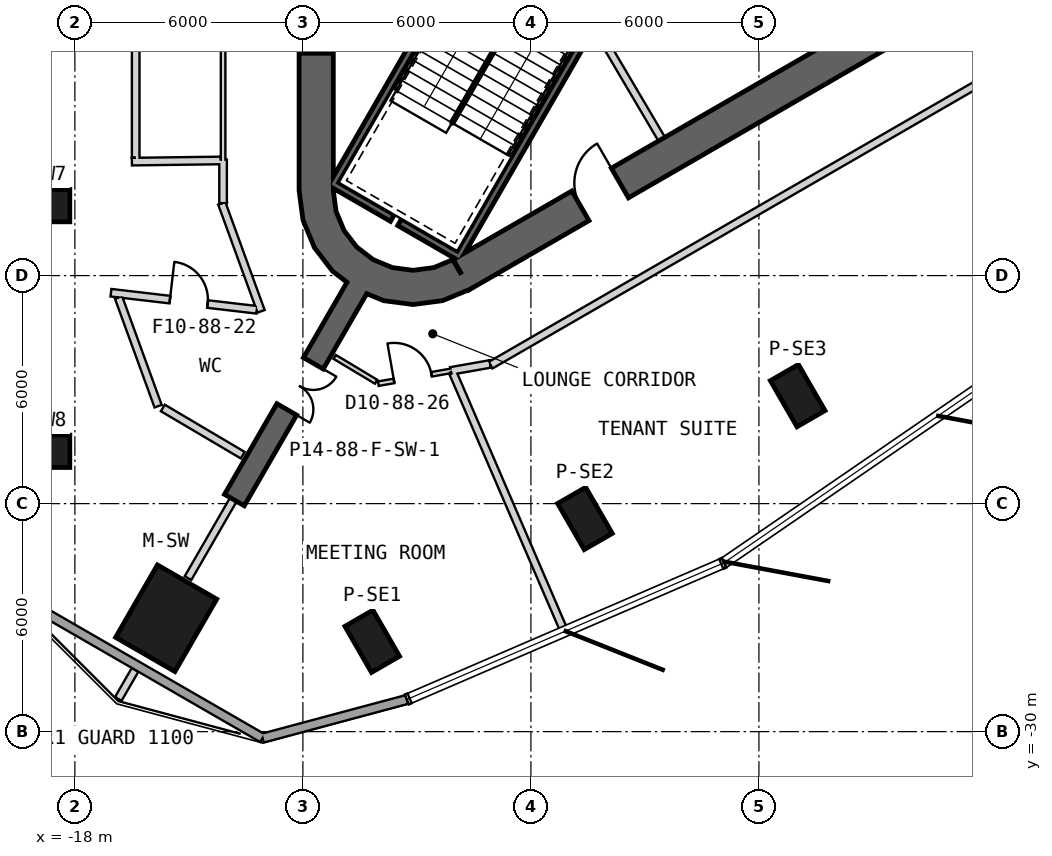
"""IFC4 building model, lengths in metres.
Left out: names, types, materials, properties, quantities, classifications, styles, units other than length and angle.
Written with IfcOpenShell. Run it as: python <this file> out.ifc"""

import sys

from ifc_helpers import new_model, si_unit, direction, frame, frame_2d, origin, origin_2d, place, context, subcontext, project, spatial, polyline, rectangle, outline, extrude, element, fill, save


model = new_model("IFC4")
c1 = context("Model", 3, precision=1e-05, world=origin(), true_north=direction((0.0, 1.0)))
c2 = subcontext(c1, "Body", "Model", "MODEL_VIEW")
j1 = project(units=[si_unit("LENGTHUNIT", "METRE"), si_unit("PLANEANGLEUNIT", "RADIAN")], contexts=[c1])
p1 = place(None, origin())
s1 = spatial("IfcSite", under=j1, at=p1, CompositionType="ELEMENT")
p2 = place(p1, origin())
s2 = spatial("IfcBuilding", under=s1, at=p2, CompositionType="ELEMENT")
p3 = place(p2, frame((0.0, 0.0, 380.6)))
s3 = spatial("IfcBuildingStorey", under=s2, at=p3, CompositionType="ELEMENT", Elevation=380.6)
p4 = place(p3, frame((-15.598, -27.016, 0.0), z_axis=(0.0, 0.0, 1.0), x_axis=(-0.5, -0.866025403784, 0.0)))
e1 = element("IfcColumn", 1, at=p4, inside=s3, PredefinedType="COLUMN", context=c2, shape_type="SweptSolid", body=[
    extrude(rectangle(XDim=2.2, YDim=1.8, at=origin_2d()), origin(), (0.0, 0.0, 1.0), 3.9),
])
for number, where, z_axis, x_axis in (
    (2, (-18.834, -16.16, 0.0), (0.0, 0.0, 1.0), (-1.0, 0.0, 0.0)),
    (3, (-18.834, -22.624, 0.0), (0.0, 0.0, 1.0), (-1.0, 0.0, 0.0)),
    (4, (-10.176, -27.623, 0.0), (0.0, 0.0, 1.0), (0.5, -0.866, 0.0)),
    (5, (-4.578, -24.391, 0.0), (0.0, 0.0, 1.0), (0.5, -0.866, 0.0)),
    (6, (1.02, -21.159, 0.0), (0.0, 0.0, 1.0), (0.5, -0.866, 0.0)),
):
    element("IfcColumn", number, at=place(p3, frame(where, z_axis=z_axis, x_axis=x_axis)), inside=s3, PredefinedType="COLUMN", context=c2, shape_type="SweptSolid", body=[
        extrude(rectangle(XDim=1.4, YDim=0.85, at=origin_2d()), origin(), (0.0, 0.0, 1.0), 3.9),
    ])
p5 = place(p3, frame((-11.65, 15.762, 0.0), z_axis=(0.0, 0.0, 1.0), x_axis=(0.0, -1.0, 0.0)))
e7 = element("IfcWall", 7, at=p5, inside=s3, PredefinedType="SHEAR", context=c2, shape_type="SweptSolid", body=[
    extrude(rectangle(XDim=31.523, YDim=0.9, at=frame_2d((15.762, 0.0))), origin(), (0.0, 0.0, 1.0), 3.9),
])
p6 = place(p5, frame((7.062, 0.0, 0.0)))
e8 = element("IfcOpeningElement", 8, at=p6, cuts=e7, PredefinedType="OPENING", context=c2, shape_type="SweptSolid", body=[
    extrude(rectangle(XDim=1.2, YDim=2.4, at=frame_2d((0.6, 1.2))), frame((0.0, 0.46, 0.0), z_axis=(0.0, -1.0, 0.0), x_axis=(1.0, 0.0, 0.0)), (0.0, 0.0, 1.0), 0.92),
])
p7 = place(p5, frame((9.762, 0.0, 0.0)))
e9 = element("IfcOpeningElement", 9, at=p7, cuts=e7, PredefinedType="OPENING", context=c2, shape_type="SweptSolid", body=[
    extrude(rectangle(XDim=1.2, YDim=2.4, at=frame_2d((0.6, 1.2))), frame((0.0, 0.46, 0.0), z_axis=(0.0, -1.0, 0.0), x_axis=(1.0, 0.0, 0.0)), (0.0, 0.0, 1.0), 0.92),
])
p8 = place(p5, frame((12.462, 0.0, 0.0)))
e10 = element("IfcOpeningElement", 10, at=p8, cuts=e7, PredefinedType="OPENING", context=c2, shape_type="SweptSolid", body=[
    extrude(rectangle(XDim=1.2, YDim=2.4, at=frame_2d((0.6, 1.2))), frame((0.0, 0.46, 0.0), z_axis=(0.0, -1.0, 0.0), x_axis=(1.0, 0.0, 0.0)), (0.0, 0.0, 1.0), 0.92),
])
p9 = place(p5, frame((15.162, 0.0, 0.0)))
e11 = element("IfcOpeningElement", 11, at=p9, cuts=e7, PredefinedType="OPENING", context=c2, shape_type="SweptSolid", body=[
    extrude(rectangle(XDim=1.2, YDim=2.4, at=frame_2d((0.6, 1.2))), frame((0.0, 0.46, 0.0), z_axis=(0.0, -1.0, 0.0), x_axis=(1.0, 0.0, 0.0)), (0.0, 0.0, 1.0), 0.92),
])
p10 = place(p5, frame((17.862, 0.0, 0.0)))
e12 = element("IfcOpeningElement", 12, at=p10, cuts=e7, PredefinedType="OPENING", context=c2, shape_type="SweptSolid", body=[
    extrude(rectangle(XDim=1.2, YDim=2.4, at=frame_2d((0.6, 1.2))), frame((0.0, 0.46, 0.0), z_axis=(0.0, -1.0, 0.0), x_axis=(1.0, 0.0, 0.0)), (0.0, 0.0, 1.0), 0.92),
])
p11 = place(p5, frame((20.562, 0.0, 0.0)))
e13 = element("IfcOpeningElement", 13, at=p11, cuts=e7, PredefinedType="OPENING", context=c2, shape_type="SweptSolid", body=[
    extrude(rectangle(XDim=1.2, YDim=2.4, at=frame_2d((0.6, 1.2))), frame((0.0, 0.46, 0.0), z_axis=(0.0, -1.0, 0.0), x_axis=(1.0, 0.0, 0.0)), (0.0, 0.0, 1.0), 0.92),
])
p12 = place(p5, frame((23.262, 0.0, 0.0)))
e14 = element("IfcOpeningElement", 14, at=p12, cuts=e7, PredefinedType="OPENING", context=c2, shape_type="SweptSolid", body=[
    extrude(rectangle(XDim=1.2, YDim=2.4, at=frame_2d((0.6, 1.2))), frame((0.0, 0.46, 0.0), z_axis=(0.0, -1.0, 0.0), x_axis=(1.0, 0.0, 0.0)), (0.0, 0.0, 1.0), 0.92),
])
p13 = place(p5, frame((3.612, 0.0, 0.0)))
e15 = element("IfcOpeningElement", 15, at=p13, cuts=e7, PredefinedType="OPENING", context=c2, shape_type="SweptSolid", body=[
    extrude(rectangle(XDim=1.2, YDim=2.4, at=frame_2d((0.6, 1.2))), frame((0.0, 0.46, 0.0), z_axis=(0.0, -1.0, 0.0), x_axis=(1.0, 0.0, 0.0)), (0.0, 0.0, 1.0), 0.92),
])
p14 = place(p5, frame((26.712, 0.0, 0.0)))
e16 = element("IfcOpeningElement", 16, at=p14, cuts=e7, PredefinedType="OPENING", context=c2, shape_type="SweptSolid", body=[
    extrude(rectangle(XDim=1.2, YDim=2.4, at=frame_2d((0.6, 1.2))), frame((0.0, 0.46, 0.0), z_axis=(0.0, -1.0, 0.0), x_axis=(1.0, 0.0, 0.0)), (0.0, 0.0, 1.0), 0.92),
])
p15 = place(p3, frame((-7.825, -17.97, 0.0), z_axis=(0.0, 0.0, 1.0), x_axis=(0.866028369851, 0.499994862586, 0.0)))
e17 = element("IfcWall", 17, at=p15, inside=s3, PredefinedType="SHEAR", context=c2, shape_type="SweptSolid", body=[
    extrude(rectangle(XDim=31.523, YDim=0.9, at=frame_2d((15.762, 0.0))), origin(), (0.0, 0.0, 1.0), 3.9),
])
p16 = place(p15, frame((17.862, 0.0, 0.0)))
e18 = element("IfcOpeningElement", 18, at=p16, cuts=e17, PredefinedType="OPENING", context=c2, shape_type="SweptSolid", body=[
    extrude(rectangle(XDim=1.2, YDim=2.4, at=frame_2d((0.6, 1.2))), frame((0.0, 0.46, 0.0), z_axis=(0.0, -1.0, 0.0), x_axis=(1.0, 0.0, 0.0)), (0.0, 0.0, 1.0), 0.92),
])
p17 = place(p15, frame((20.562, 0.0, 0.0)))
e19 = element("IfcOpeningElement", 19, at=p17, cuts=e17, PredefinedType="OPENING", context=c2, shape_type="SweptSolid", body=[
    extrude(rectangle(XDim=1.2, YDim=2.4, at=frame_2d((0.6, 1.2))), frame((0.0, 0.46, 0.0), z_axis=(0.0, -1.0, 0.0), x_axis=(1.0, 0.0, 0.0)), (0.0, 0.0, 1.0), 0.92),
])
p18 = place(p15, frame((26.712, 0.0, 0.0)))
e20 = element("IfcOpeningElement", 20, at=p18, cuts=e17, PredefinedType="OPENING", context=c2, shape_type="SweptSolid", body=[
    extrude(rectangle(XDim=1.2, YDim=2.4, at=frame_2d((0.6, 1.2))), frame((0.0, 0.46, 0.0), z_axis=(0.0, -1.0, 0.0), x_axis=(1.0, 0.0, 0.0)), (0.0, 0.0, 1.0), 0.92),
])
p19 = place(p15, frame((3.612, 0.0, 0.0)))
e21 = element("IfcOpeningElement", 21, at=p19, cuts=e17, PredefinedType="OPENING", context=c2, shape_type="SweptSolid", body=[
    extrude(rectangle(XDim=1.2, YDim=2.4, at=frame_2d((0.6, 1.2))), frame((0.0, 0.46, 0.0), z_axis=(0.0, -1.0, 0.0), x_axis=(1.0, 0.0, 0.0)), (0.0, 0.0, 1.0), 0.92),
])
p20 = place(p3, origin())
e22 = element("IfcWall", 22, at=p20, inside=s3, PredefinedType="SHEAR", context=c2, shape_type="SweptSolid", body=[
    extrude(outline(polyline([(-12.1, -15.762), (-11.998, -16.538), (-11.698, -17.262), (-11.221, -17.883), (-10.6, -18.36), (-9.876, -18.659), (-9.1, -18.762), (-8.323, -18.659), (-7.6, -18.36), (-8.05, -17.58), (-8.556, -17.79), (-9.1, -17.862), (-9.644, -17.79), (-10.15, -17.58), (-10.585, -17.247), (-10.919, -16.812), (-11.128, -16.305), (-11.2, -15.762), (-12.1, -15.762)])), origin(), (0.0, 0.0, 1.0), 3.9),
])
p21 = place(p3, frame((-10.575, -18.316, 0.0), z_axis=(0.0, 0.0, 1.0), x_axis=(-0.500011655475, -0.866018674388, 0.0)))
e23 = element("IfcWall", 23, at=p21, inside=s3, PredefinedType="SHEAR", context=c2, shape_type="SweptSolid", body=[
    extrude(rectangle(XDim=6.455, YDim=0.6, at=frame_2d((3.228, 0.0))), origin(), (0.0, 0.0, 1.0), 3.9),
])
p22 = place(p21, frame((2.35, 0.0, 0.0)))
e24 = element("IfcOpeningElement", 24, at=p22, cuts=e23, PredefinedType="OPENING", context=c2, shape_type="SweptSolid", body=[
    extrude(rectangle(XDim=1.4, YDim=2.4, at=frame_2d((0.7, 1.2))), frame((0.0, 0.31, 0.0), z_axis=(0.0, -1.0, 0.0), x_axis=(1.0, 0.0, 0.0)), (0.0, 0.0, 1.0), 0.62),
])
p23 = place(p3, frame((-19.598, -26.398, 0.0), z_axis=(0.0, 0.0, 1.0), x_axis=(0.86602506914, -0.500000579621, 0.0)))
e25 = element("IfcWall", 25, at=p23, inside=s3, PredefinedType="SOLIDWALL", context=c2, shape_type="SweptSolid", body=[
    extrude(rectangle(XDim=7.548, YDim=0.24, at=frame_2d((3.774, 0.0))), origin(), (0.0, 0.0, 1.0), 3.6),
])
p24 = place(p3, frame((-13.062, -30.172, 0.0), z_axis=(0.0, 0.0, 1.0), x_axis=(0.965923930123, 0.258826121588, 0.0)))
e26 = element("IfcWall", 26, at=p24, inside=s3, PredefinedType="SOLIDWALL", context=c2, shape_type="SweptSolid", body=[
    extrude(rectangle(XDim=3.931, YDim=0.24, at=frame_2d((1.965, 0.0))), origin(), (0.0, 0.0, 1.0), 3.6),
])
p25 = place(p3, frame((-3.905, -10.563, -0.3), z_axis=(0.0, 0.0, 1.0), x_axis=(-0.500012932018, -0.866017937352, 0.0)))
e27 = element("IfcWall", 27, at=p25, inside=s3, PredefinedType="SHEAR", context=c2, shape_type="SweptSolid", body=[
    extrude(rectangle(XDim=8.1, YDim=0.2, at=frame_2d((4.05, 0.0))), origin(), (0.0, 0.0, 1.0), 3.9),
])
p26 = place(p3, frame((-11.282, -15.541, -0.3), z_axis=(0.0, 0.0, 1.0), x_axis=(0.866000578957, -0.500042995397, 0.0)))
e28 = element("IfcWall", 28, at=p26, inside=s3, PredefinedType="SHEAR", context=c2, shape_type="SweptSolid", body=[
    extrude(rectangle(XDim=1.89, YDim=0.2, at=frame_2d((0.945, 0.0))), origin(), (0.0, 0.0, 1.0), 3.9),
])
p27 = place(p3, frame((-9.455, -16.596, -0.3), z_axis=(0.0, 0.0, 1.0), x_axis=(0.866038843867, -0.499976720371, 0.0)))
e29 = element("IfcWall", 29, at=p27, inside=s3, PredefinedType="SHEAR", context=c2, shape_type="SweptSolid", body=[
    extrude(rectangle(XDim=1.69, YDim=0.2, at=frame_2d((0.845, 0.0))), origin(), (0.0, 0.0, 1.0), 3.9),
])
p28 = place(p3, frame((-7.196, -8.663, -0.3), z_axis=(0.0, 0.0, 1.0), x_axis=(-0.499997992926, -0.866026562566, 0.0)))
e30 = element("IfcWall", 30, at=p28, inside=s3, PredefinedType="SHEAR", context=c2, shape_type="SweptSolid", body=[
    extrude(rectangle(XDim=7.9, YDim=0.2, at=frame_2d((3.95, 0.0))), origin(), (0.0, 0.0, 1.0), 3.9),
])
p29 = place(p3, frame((-1.897, -10.275, 0.0), z_axis=(0.0, 0.0, 1.0), x_axis=(0.499984717929, -0.866034226713, 0.0)))
e31 = element("IfcWall", 31, at=p29, inside=s3, PredefinedType="PARTITIONING", context=c2, shape_type="SweptSolid", body=[
    extrude(rectangle(XDim=3.25, YDim=0.12, at=frame_2d((1.625, 0.0))), origin(), (0.0, 0.0, 1.0), 3.6),
])
p30 = place(p3, frame((-4.26, -11.524, 0.0), z_axis=(0.0, 0.0, 1.0), x_axis=(0.507997497166, -0.861358544901, 0.0)))
e32 = element("IfcWall", 32, at=p30, inside=s3, PredefinedType="PARTITIONING", context=c2, shape_type="SweptSolid", body=[
    extrude(rectangle(XDim=3.35, YDim=0.2, at=frame_2d((1.675, 0.0))), origin(), (0.0, 0.0, 1.0), 3.6),
])
p31 = place(p30, frame((1.325, 0.0, 0.0)))
e33 = element("IfcOpeningElement", 33, at=p31, cuts=e32, PredefinedType="OPENING", context=c2, shape_type="SweptSolid", body=[
    extrude(rectangle(XDim=0.8, YDim=2.1, at=frame_2d((0.4, 1.05))), frame((0.0, 0.11, 0.0), z_axis=(0.0, -1.0, 0.0), x_axis=(1.0, 0.0, 0.0)), (0.0, 0.0, 1.0), 0.22),
])
p32 = place(p3, frame((-13.051, -19.077, 0.0), z_axis=(0.0, 0.0, 1.0), x_axis=(0.87441884207, -0.485171813519, 0.0)))
e34 = element("IfcWall", 34, at=p32, inside=s3, PredefinedType="PARTITIONING", context=c2, shape_type="SweptSolid", body=[
    extrude(rectangle(XDim=1.364, YDim=0.2, at=frame_2d((0.682, 0.0))), origin(), (0.0, 0.0, 1.0), 3.6),
])
p33 = place(p3, frame((-14.1, -6.373, 0.0), z_axis=(0.0, 0.0, 1.0), x_axis=(0.0, -1.0, 0.0)))
e35 = element("IfcWall", 35, at=p33, inside=s3, PredefinedType="PARTITIONING", context=c2, shape_type="SweptSolid", body=[
    extrude(rectangle(XDim=6.662, YDim=0.12, at=frame_2d((3.331, 0.0))), origin(), (0.0, 0.0, 1.0), 2.97),
])
p34 = place(p33, frame((2.932, 0.0, 0.0)))
e36 = element("IfcOpeningElement", 36, at=p34, cuts=e35, PredefinedType="OPENING", context=c2, shape_type="SweptSolid", body=[
    extrude(rectangle(XDim=0.9, YDim=2.1, at=frame_2d((0.45, 1.05))), frame((0.0, 0.07, 0.0), z_axis=(0.0, -1.0, 0.0), x_axis=(1.0, 0.0, 0.0)), (0.0, 0.0, 1.0), 0.14),
])
p35 = place(p3, frame((-14.1, -13.035, 0.0), z_axis=(0.0, 0.0, 1.0), x_axis=(0.0, -1.0, 0.0)))
e37 = element("IfcWall", 37, at=p35, inside=s3, PredefinedType="PARTITIONING", context=c2, shape_type="SweptSolid", body=[
    extrude(rectangle(XDim=3.099, YDim=0.12, at=frame_2d((1.549, 0.0))), origin(), (0.0, 0.0, 1.0), 3.6),
])
p36 = place(p35, frame((1.249, 0.0, 0.0)))
e38 = element("IfcOpeningElement", 38, at=p36, cuts=e37, PredefinedType="OPENING", context=c2, shape_type="SweptSolid", body=[
    extrude(rectangle(XDim=0.9, YDim=2.1, at=frame_2d((0.45, 1.05))), frame((0.0, 0.07, 0.0), z_axis=(0.0, -1.0, 0.0), x_axis=(1.0, 0.0, 0.0)), (0.0, 0.0, 1.0), 0.14),
])
p37 = place(p3, frame((-14.121, -16.137, 0.0), z_axis=(0.0, 0.0, 1.0), x_axis=(0.342063022862, -0.939677012803, 0.0)))
e39 = element("IfcWall", 39, at=p37, inside=s3, PredefinedType="PARTITIONING", context=c2, shape_type="SweptSolid", body=[
    extrude(rectangle(XDim=2.941, YDim=0.12, at=frame_2d((1.47, 0.0))), origin(), (0.0, 0.0, 1.0), 2.97),
])
p38 = place(p3, frame((-17.7, -16.928, 0.0), z_axis=(0.0, 0.0, 1.0), x_axis=(0.0, 1.0, 0.0)))
e40 = element("IfcWall", 40, at=p38, inside=s3, PredefinedType="PARTITIONING", context=c2, shape_type="SweptSolid", body=[
    extrude(rectangle(XDim=2.791, YDim=0.2, at=frame_2d((1.396, 0.0))), origin(), (0.0, 0.0, 1.0), 2.97),
])
p39 = place(p3, frame((-17.7, -14.137, 0.0), z_axis=(0.0, 0.0, 1.0), x_axis=(0.0, 1.0, 0.0)))
e41 = element("IfcWall", 41, at=p39, inside=s3, PredefinedType="PARTITIONING", context=c2, shape_type="SweptSolid", body=[
    extrude(rectangle(XDim=7.454, YDim=0.2, at=frame_2d((3.727, 0.0))), origin(), (0.0, 0.0, 1.0), 3.07),
])
p40 = place(p3, frame((-17.666, -16.922, 0.0), z_axis=(0.0, 0.0, 1.0), x_axis=(0.342004686592, -0.939698246433, 0.0)))
e42 = element("IfcWall", 42, at=p40, inside=s3, PredefinedType="PARTITIONING", context=c2, shape_type="SweptSolid", body=[
    extrude(rectangle(XDim=3.372, YDim=0.2, at=frame_2d((1.686, 0.0))), origin(), (0.0, 0.0, 1.0), 2.97),
])
p41 = place(p3, frame((-16.448, -19.975, 0.0), z_axis=(0.0, 0.0, 1.0), x_axis=(0.960187968548, 0.279354729788, 0.0)))
e43 = element("IfcWall", 43, at=p41, inside=s3, PredefinedType="PARTITIONING", context=c2, shape_type="SweptSolid", body=[
    extrude(rectangle(XDim=3.574, YDim=0.2, at=frame_2d((1.787, 0.0))), origin(), (0.0, 0.0, 1.0), 2.97),
])
p42 = place(p3, frame((-16.858, -29.138, 0.0), z_axis=(0.0, 0.0, 1.0), x_axis=(0.500033502416, 0.866006060292, 0.0)))
e44 = element("IfcWall", 44, at=p42, inside=s3, PredefinedType="PARTITIONING", context=c2, shape_type="SweptSolid", body=[
    extrude(rectangle(XDim=0.883, YDim=0.2, at=frame_2d((0.442, 0.0))), origin(), (0.0, 0.0, 1.0), 3.6),
])
p43 = place(p3, frame((-15.024, -25.962, 0.0), z_axis=(0.0, 0.0, 1.0), x_axis=(0.500037706602, 0.866003632773, 0.0)))
e45 = element("IfcWall", 45, at=p43, inside=s3, PredefinedType="PARTITIONING", context=c2, shape_type="SweptSolid", body=[
    extrude(rectangle(XDim=2.391, YDim=0.2, at=frame_2d((1.195, 0.0))), origin(), (0.0, 0.0, 1.0), 3.17),
])
p44 = place(p3, frame((-17.6, -14.093, 0.0), z_axis=(0.0, 0.0, 1.0), x_axis=(0.957925393659, 0.287017316871, 0.0)))
e46 = element("IfcWall", 46, at=p44, inside=s3, PredefinedType="PARTITIONING", context=c2, shape_type="SweptSolid", body=[
    extrude(rectangle(XDim=3.591, YDim=0.12, at=frame_2d((1.796, 0.0))), origin(), (0.0, 0.0, 1.0), 2.97),
])
p45 = place(p3, frame((-7.061, -20.358, 0.0), z_axis=(0.0, 0.0, 1.0), x_axis=(0.866024332115, 0.500001856182, 0.0)))
e47 = element("IfcWall", 47, at=p45, inside=s3, PredefinedType="PARTITIONING", context=c2, shape_type="SweptSolid", body=[
    extrude(rectangle(XDim=8.925, YDim=0.2, at=frame_2d((4.463, 0.0))), origin(), (0.0, 0.0, 1.0), 2.97),
])
p46 = place(p45, frame((4.1, 0.0, 0.0)))
e48 = element("IfcOpeningElement", 48, at=p46, cuts=e47, PredefinedType="OPENING", context=c2, shape_type="SweptSolid", body=[
    extrude(rectangle(XDim=1.0, YDim=2.1, at=frame_2d((0.5, 1.05))), frame((0.0, 0.11, 0.0), z_axis=(0.0, -1.0, 0.0), x_axis=(1.0, 0.0, 0.0)), (0.0, 0.0, 1.0), 0.22),
])
p47 = place(p3, frame((0.669, -15.895, 0.0), z_axis=(0.0, 0.0, 1.0), x_axis=(0.866018980909, 0.500011124582, 0.0)))
e49 = element("IfcWall", 49, at=p47, inside=s3, PredefinedType="PARTITIONING", context=c2, shape_type="SweptSolid", body=[
    extrude(rectangle(XDim=6.808, YDim=0.2, at=frame_2d((3.404, 0.0))), origin(), (0.0, 0.0, 1.0), 3.07),
])
p48 = place(p47, frame((3.056, 0.0, 0.0)))
e50 = element("IfcOpeningElement", 50, at=p48, cuts=e49, PredefinedType="OPENING", context=c2, shape_type="SweptSolid", body=[
    extrude(rectangle(XDim=1.0, YDim=2.1, at=frame_2d((0.5, 1.05))), frame((0.0, 0.11, 0.0), z_axis=(0.0, -1.0, 0.0), x_axis=(1.0, 0.0, 0.0)), (0.0, 0.0, 1.0), 0.22),
])
p49 = place(p3, frame((-10.032, -20.847, 0.0), z_axis=(0.0, 0.0, 1.0), x_axis=(0.984816253597, 0.173599961555, 0.0)))
e51 = element("IfcWall", 51, at=p49, inside=s3, PredefinedType="PARTITIONING", context=c2, shape_type="SweptSolid", body=[
    extrude(rectangle(XDim=3.005, YDim=0.2, at=frame_2d((1.503, 0.0))), origin(), (0.0, 0.0, 1.0), 2.97),
])
p50 = place(p3, frame((-11.165, -20.138, 0.0), z_axis=(0.0, 0.0, 1.0), x_axis=(0.857404013622, -0.51464391323, 0.0)))
e52 = element("IfcWall", 52, at=p50, inside=s3, PredefinedType="PARTITIONING", context=c2, shape_type="SweptSolid", body=[
    extrude(rectangle(XDim=1.212, YDim=0.2, at=frame_2d((0.606, 0.0))), origin(), (0.0, 0.0, 1.0), 3.6),
])
p51 = place(p3, frame((4.688, -21.709, 0.0), z_axis=(0.0, 0.0, 1.0), x_axis=(-0.565900898816, 0.824473269864, 0.0)))
e53 = element("IfcWall", 53, at=p51, inside=s3, PredefinedType="PARTITIONING", context=c2, shape_type="SweptSolid", body=[
    extrude(rectangle(XDim=6.965, YDim=0.2, at=frame_2d((3.483, 0.0))), origin(), (0.0, 0.0, 1.0), 3.07),
])
p52 = place(p31, origin())
e54 = element("IfcDoor", 54, at=p52, inside=s3, OperationType="SINGLE_SWING_LEFT", PredefinedType="USERDEFINED", context=c2, shape_type="SweptSolid", body=[
    extrude(rectangle(XDim=0.8, YDim=2.1, at=frame_2d((0.4, 1.05))), frame((0.0, 0.025, 0.0), z_axis=(0.0, -1.0, 0.0), x_axis=(1.0, 0.0, 0.0)), (0.0, 0.0, 1.0), 0.05),
])
fill(e33, e54)
p53 = place(p36, origin())
e55 = element("IfcDoor", 55, at=p53, inside=s3, OperationType="SINGLE_SWING_LEFT", PredefinedType="NOTDEFINED", context=c2, shape_type="SweptSolid", body=[
    extrude(rectangle(XDim=0.9, YDim=2.1, at=frame_2d((0.45, 1.05))), frame((0.0, 0.025, 0.0), z_axis=(0.0, -1.0, 0.0), x_axis=(1.0, 0.0, 0.0)), (0.0, 0.0, 1.0), 0.05),
])
fill(e38, e55)
p54 = place(p46, origin())
e56 = element("IfcDoor", 56, at=p54, inside=s3, OperationType="SINGLE_SWING_RIGHT", PredefinedType="USERDEFINED", context=c2, shape_type="SweptSolid", body=[
    extrude(rectangle(XDim=1.0, YDim=2.1, at=frame_2d((0.5, 1.05))), frame((0.0, 0.025, 0.0), z_axis=(0.0, -1.0, 0.0), x_axis=(1.0, 0.0, 0.0)), (0.0, 0.0, 1.0), 0.05),
])
fill(e48, e56)
p55 = place(p48, origin())
e57 = element("IfcDoor", 57, at=p55, inside=s3, OperationType="SINGLE_SWING_RIGHT", PredefinedType="USERDEFINED", context=c2, shape_type="SweptSolid", body=[
    extrude(rectangle(XDim=1.0, YDim=2.1, at=frame_2d((0.5, 1.05))), frame((0.0, 0.025, 0.0), z_axis=(0.0, -1.0, 0.0), x_axis=(1.0, 0.0, 0.0)), (0.0, 0.0, 1.0), 0.05),
])
fill(e50, e57)
p56 = place(p14, origin())
e58 = element("IfcDoor", 58, at=p56, inside=s3, OperationType="SINGLE_SWING_LEFT", PredefinedType="USERDEFINED", context=c2, shape_type="SweptSolid", body=[
    extrude(rectangle(XDim=1.2, YDim=2.4, at=frame_2d((0.6, 1.2))), frame((0.0, 0.025, 0.0), z_axis=(0.0, -1.0, 0.0), x_axis=(1.0, 0.0, 0.0)), (0.0, 0.0, 1.0), 0.05),
])
fill(e16, e58)
p57 = place(p19, origin())
e59 = element("IfcDoor", 59, at=p57, inside=s3, OperationType="SINGLE_SWING_RIGHT", PredefinedType="USERDEFINED", context=c2, shape_type="SweptSolid", body=[
    extrude(rectangle(XDim=1.2, YDim=2.4, at=frame_2d((0.6, 1.2))), frame((0.0, 0.025, 0.0), z_axis=(0.0, -1.0, 0.0), x_axis=(1.0, 0.0, 0.0)), (0.0, 0.0, 1.0), 0.05),
])
fill(e21, e59)
p58 = place(p22, origin())
e60 = element("IfcDoor", 60, at=p58, inside=s3, OperationType="DOUBLE_DOOR_SINGLE_SWING", PredefinedType="NOTDEFINED", context=c2, shape_type="SweptSolid", body=[
    extrude(rectangle(XDim=1.4, YDim=2.4, at=frame_2d((0.7, 1.2))), frame((0.0, 0.025, 0.0), z_axis=(0.0, -1.0, 0.0), x_axis=(1.0, 0.0, 0.0)), (0.0, 0.0, 1.0), 0.05),
])
fill(e24, e60)
save(model, sys.argv[1])
